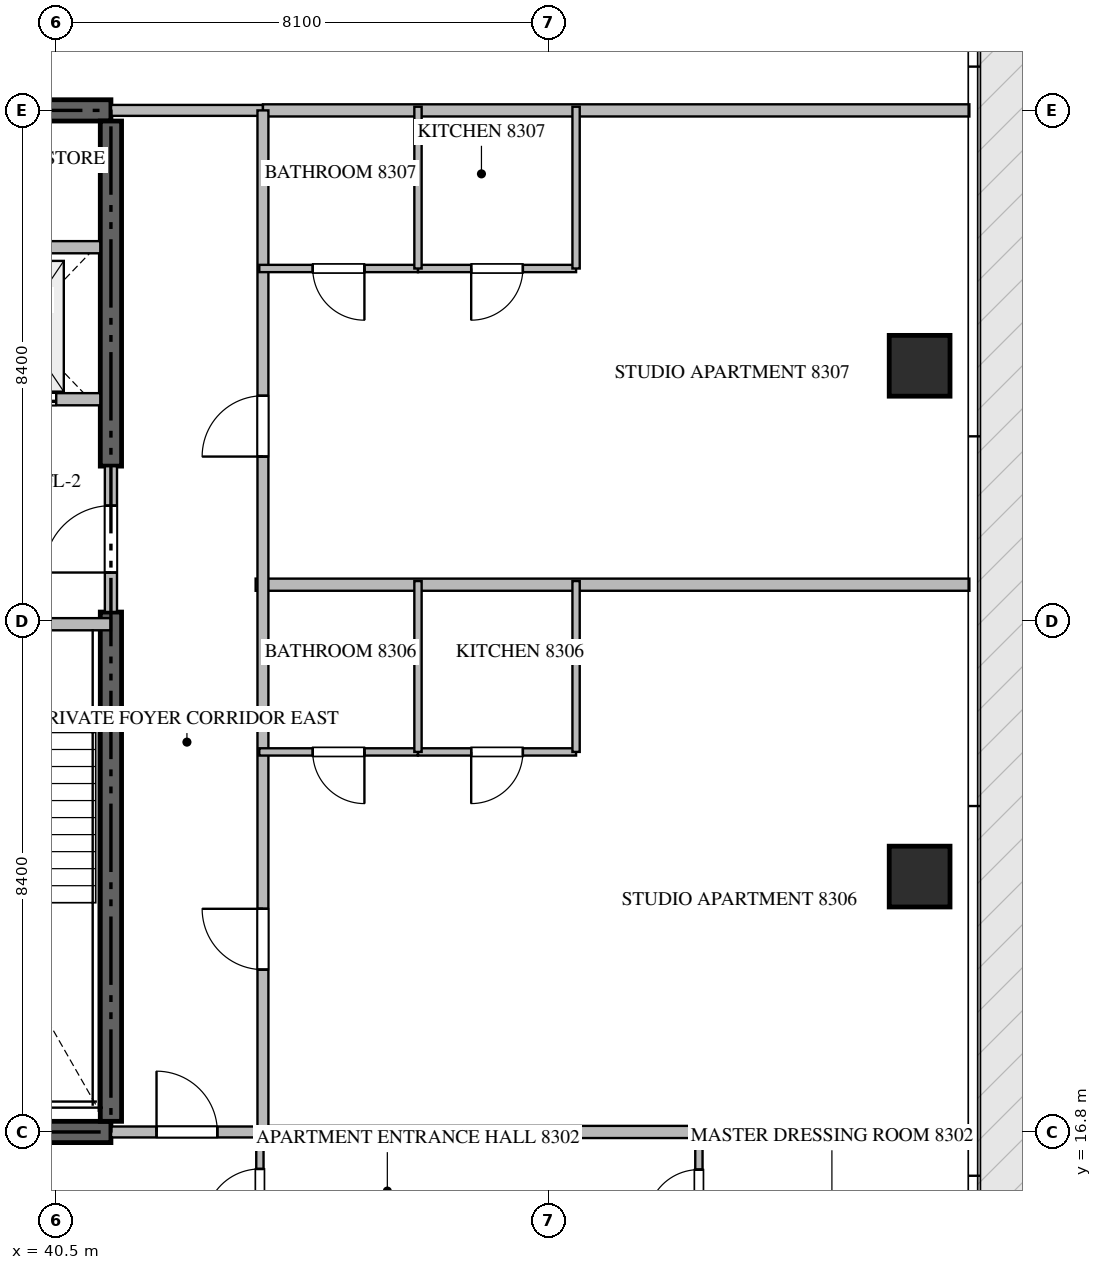
"""IFC4 building model, lengths in metres.
Left out: names, types, materials, properties, quantities, classifications, styles, units other than length and angle.
Written with IfcOpenShell. Run it as: python <this file> out.ifc"""

import sys

from ifc_helpers import new_model, si_unit, direction, frame, frame_2d, origin, origin_2d, place, context, subcontext, project, spatial, rectangle, extrude, source, transform, mapped, element, fill, save


model = new_model("IFC4")
c1 = context("Model", 3, precision=1e-05, world=origin(), true_north=direction((0.0, 1.0)))
c2 = subcontext(c1, "Body", "Model", "MODEL_VIEW")
j1 = project(units=[si_unit("LENGTHUNIT", "METRE"), si_unit("PLANEANGLEUNIT", "RADIAN")], contexts=[c1])
p1 = place(None, origin())
s1 = spatial("IfcSite", under=j1, at=p1, CompositionType="ELEMENT")
p2 = place(p1, origin())
s2 = spatial("IfcBuilding", under=s1, at=p2, CompositionType="ELEMENT")
p3 = place(p2, frame((0.0, 0.0, 333.95)))
s3 = spatial("IfcBuildingStorey", under=s2, at=p3, CompositionType="ELEMENT", Elevation=333.95)
for number, where, z_axis, x_axis in (
    (1, (23.4, 16.8, -0.26), (0.0, 0.0, 1.0), (1.0, 0.0, 0.0)),
    (2, (41.4, 33.6, -0.26), (0.0, 0.0, 1.0), (-1.0, 0.0, 0.0)),
):
    element("IfcWall", number, at=place(p3, frame(where, z_axis=z_axis, x_axis=x_axis)), inside=s3, PredefinedType="SHEAR", context=c2, shape_type="SweptSolid", body=[
        extrude(rectangle(XDim=18.0, YDim=0.35, at=frame_2d((9.0, 0.0))), origin(), (0.0, 0.0, 1.0), 3.868),
    ])
p4 = place(p3, frame((41.4, 16.975, -0.26), z_axis=(0.0, 0.0, 1.0), x_axis=(0.0, 1.0, 0.0)))
e3 = element("IfcWall", 3, at=p4, inside=s3, PredefinedType="SHEAR", context=c2, shape_type="SweptSolid", body=[
    extrude(rectangle(XDim=8.375, YDim=0.35, at=frame_2d((4.188, 0.0))), origin(), (0.0, 0.0, 1.0), 3.868),
])
p5 = place(p3, frame((41.4, 27.75, -0.26), z_axis=(0.0, 0.0, 1.0), x_axis=(0.0, 1.0, 0.0)))
e4 = element("IfcWall", 4, at=p5, inside=s3, PredefinedType="SHEAR", context=c2, shape_type="SweptSolid", body=[
    extrude(rectangle(XDim=5.675, YDim=0.35, at=frame_2d((2.837, 0.0))), origin(), (0.0, 0.0, 1.0), 3.868),
])
m1 = source(origin(), c2, "Body", "SweptSolid", [
    extrude(rectangle(XDim=1.0, YDim=1.0, at=origin_2d()), origin(), (0.0, 0.0, 1.0), 3.87),
])
for number, where, z_axis, x_axis in (
    (5, (54.7, 21.0, -0.26), (0.0, 0.0, 1.0), (1.0, 0.0, 0.0)),
    (6, (54.7, 29.4, -0.26), (0.0, 0.0, 1.0), (1.0, 0.0, 0.0)),
):
    element("IfcColumn", number, at=place(p3, frame(where, z_axis=z_axis, x_axis=x_axis)), inside=s3, PredefinedType="COLUMN", context=c2, shape_type="MappedRepresentation", body=[
        mapped(m1, transform((0.0, 0.0, 0.0), scale=1.0)),
    ])
p6 = place(p3, frame((36.95, 25.15, 0.0), z_axis=(0.0, 0.0, 1.0), x_axis=(1.0, 0.0, 0.0)))
e7 = element("IfcWall", 7, at=p6, inside=s3, PredefinedType="STANDARD", context=c2, shape_type="SweptSolid", body=[
    extrude(rectangle(XDim=4.45, YDim=0.2, at=frame_2d((2.225, 0.0))), origin(), (0.0, 0.0, 1.0), 3.61),
])
p7 = place(p6, frame((1.65, 0.0, 0.0)))
e8 = element("IfcOpeningElement", 8, at=p7, cuts=e7, PredefinedType="OPENING", context=c2, shape_type="SweptSolid", body=[
    extrude(rectangle(XDim=1.1, YDim=2.15, at=frame_2d((0.55, 1.075))), frame((0.0, 0.11, 0.0), z_axis=(0.0, -1.0, 0.0), x_axis=(1.0, 0.0, 0.0)), (0.0, 0.0, 1.0), 0.22),
])
p8 = place(p3, frame((38.75, 28.85, 0.0), z_axis=(0.0, 0.0, 1.0), x_axis=(1.0, 0.0, 0.0)))
e9 = element("IfcWall", 9, at=p8, inside=s3, PredefinedType="STANDARD", context=c2, shape_type="SweptSolid", body=[
    extrude(rectangle(XDim=2.475, YDim=0.2, at=frame_2d((1.238, 0.0))), origin(), (0.0, 0.0, 1.0), 3.61),
])
p9 = place(p8, frame((0.55, 0.0, 0.0)))
e10 = element("IfcOpeningElement", 10, at=p9, cuts=e9, PredefinedType="OPENING", context=c2, shape_type="SweptSolid", body=[
    extrude(rectangle(XDim=1.2, YDim=2.2, at=frame_2d((0.6, 1.1))), frame((0.0, 0.11, 0.0), z_axis=(0.0, -1.0, 0.0), x_axis=(1.0, 0.0, 0.0)), (0.0, 0.0, 1.0), 0.22),
])
p10 = place(p3, frame((38.75, 31.35, 0.0), z_axis=(0.0, 0.0, 1.0), x_axis=(1.0, 0.0, 0.0)))
e11 = element("IfcWall", 11, at=p10, inside=s3, PredefinedType="STANDARD", context=c2, shape_type="SweptSolid", body=[
    extrude(rectangle(XDim=2.475, YDim=0.2, at=frame_2d((1.238, 0.0))), origin(), (0.0, 0.0, 1.0), 3.61),
])
p11 = place(p3, frame((41.4, 25.352, 0.0), z_axis=(0.0, 0.0, 1.0), x_axis=(0.0, 1.0, 0.0)))
e12 = element("IfcWall", 12, at=p11, inside=s3, PredefinedType="STANDARD", context=c2, shape_type="SweptSolid", body=[
    extrude(rectangle(XDim=2.396, YDim=0.2, at=frame_2d((1.198, 0.0))), origin(), (0.0, 0.0, 1.0), 3.61),
])
p12 = place(p11, frame((0.648, 0.0, 0.0)))
e13 = element("IfcOpeningElement", 13, at=p12, cuts=e12, PredefinedType="OPENING", context=c2, shape_type="SweptSolid", body=[
    extrude(rectangle(XDim=1.1, YDim=2.15, at=frame_2d((0.55, 1.075))), frame((0.0, 0.11, 0.0), z_axis=(0.0, -1.0, 0.0), x_axis=(1.0, 0.0, 0.0)), (0.0, 0.0, 1.0), 0.22),
])
p13 = place(p3, frame((43.78, 25.8, 0.0), z_axis=(0.0, 0.0, 1.0), x_axis=(1.0, 0.0, 0.0)))
e14 = element("IfcWall", 14, at=p13, inside=s3, PredefinedType="PARTITIONING", context=c2, shape_type="SweptSolid", body=[
    extrude(rectangle(XDim=11.738, YDim=0.2, at=frame_2d((5.869, 0.0))), origin(), (0.0, 0.0, 1.0), 3.61),
])
for number, where, z_axis, x_axis in (
    (15, (43.9, 16.8, 0.0), (0.0, 0.0, 1.0), (1.0, 0.0, 0.0)),
    (16, (43.9, 33.6, 0.0), (0.0, 0.0, 1.0), (1.0, 0.0, 0.0)),
):
    element("IfcWall", number, at=place(p3, frame(where, z_axis=z_axis, x_axis=x_axis)), inside=s3, PredefinedType="PARTITIONING", context=c2, shape_type="SweptSolid", body=[
        extrude(rectangle(XDim=11.618, YDim=0.2, at=frame_2d((5.809, 0.0))), origin(), (0.0, 0.0, 1.0), 3.61),
    ])
p14 = place(p3, frame((41.402, 16.8, 0.0), z_axis=(0.0, 0.0, 1.0), x_axis=(1.0, 0.0, 0.0)))
e17 = element("IfcWall", 17, at=p14, inside=s3, PredefinedType="PARTITIONING", context=c2, shape_type="SweptSolid", body=[
    extrude(rectangle(XDim=2.496, YDim=0.18, at=frame_2d((1.248, 0.0))), origin(), (0.0, 0.0, 1.0), 3.61),
])
p15 = place(p14, frame((0.748, 0.0, 0.0)))
e18 = element("IfcOpeningElement", 18, at=p15, cuts=e17, PredefinedType="OPENING", context=c2, shape_type="SweptSolid", body=[
    extrude(rectangle(XDim=1.0, YDim=2.15, at=frame_2d((0.5, 1.075))), frame((0.0, 0.1, 0.0), z_axis=(0.0, -1.0, 0.0), x_axis=(1.0, 0.0, 0.0)), (0.0, 0.0, 1.0), 0.2),
])
p16 = place(p3, frame((41.402, 33.6, 0.0), z_axis=(0.0, 0.0, 1.0), x_axis=(1.0, 0.0, 0.0)))
e19 = element("IfcWall", 19, at=p16, inside=s3, PredefinedType="PARTITIONING", context=c2, shape_type="SweptSolid", body=[
    extrude(rectangle(XDim=2.496, YDim=0.18, at=frame_2d((1.248, 0.0))), origin(), (0.0, 0.0, 1.0), 3.61),
])
p17 = place(p3, frame((43.9, 16.8, 0.0), z_axis=(0.0, 0.0, 1.0), x_axis=(0.0, 1.0, 0.0)))
e20 = element("IfcWall", 20, at=p17, inside=s3, PredefinedType="PARTITIONING", context=c2, shape_type="SweptSolid", body=[
    extrude(rectangle(XDim=16.8, YDim=0.18, at=frame_2d((8.4, 0.0))), origin(), (0.0, 0.0, 1.0), 3.61),
])
p18 = place(p17, frame((2.67, 0.0, 0.0)))
e21 = element("IfcOpeningElement", 21, at=p18, cuts=e20, PredefinedType="OPENING", context=c2, shape_type="SweptSolid", body=[
    extrude(rectangle(XDim=1.0, YDim=2.15, at=frame_2d((0.5, 1.075))), frame((0.0, 0.1, 0.0), z_axis=(0.0, -1.0, 0.0), x_axis=(1.0, 0.0, 0.0)), (0.0, 0.0, 1.0), 0.2),
])
p19 = place(p17, frame((11.107, 0.0, 0.0)))
e22 = element("IfcOpeningElement", 22, at=p19, cuts=e20, PredefinedType="OPENING", context=c2, shape_type="SweptSolid", body=[
    extrude(rectangle(XDim=1.0, YDim=2.15, at=frame_2d((0.5, 1.075))), frame((0.0, 0.1, 0.0), z_axis=(0.0, -1.0, 0.0), x_axis=(1.0, 0.0, 0.0)), (0.0, 0.0, 1.0), 0.2),
])
p20 = place(p3, frame((43.85, 14.65, 0.0), z_axis=(0.0, 0.0, 1.0), x_axis=(0.0, 1.0, 0.0)))
e23 = element("IfcWall", 23, at=p20, inside=s3, PredefinedType="PARTITIONING", context=c2, shape_type="SweptSolid", body=[
    extrude(rectangle(XDim=2.148, YDim=0.12, at=frame_2d((1.074, 0.0))), origin(), (0.0, 0.0, 1.0), 3.61),
])
p21 = place(p20, frame((0.642, 0.0, 0.0)))
e24 = element("IfcOpeningElement", 24, at=p21, cuts=e23, PredefinedType="OPENING", context=c2, shape_type="SweptSolid", body=[
    extrude(rectangle(XDim=0.9, YDim=2.1, at=frame_2d((0.45, 1.05))), frame((0.0, 0.07, 0.0), z_axis=(0.0, -1.0, 0.0), x_axis=(1.0, 0.0, 0.0)), (0.0, 0.0, 1.0), 0.14),
])
p22 = place(p3, frame((51.07, 14.652, 0.0), z_axis=(0.0, 0.0, 1.0), x_axis=(0.0, 1.0, 0.0)))
e25 = element("IfcWall", 25, at=p22, inside=s3, PredefinedType="PARTITIONING", context=c2, shape_type="SweptSolid", body=[
    extrude(rectangle(XDim=2.208, YDim=0.12, at=frame_2d((1.104, 0.0))), origin(), (0.0, 0.0, 1.0), 3.61),
])
p23 = place(p22, frame((0.679, 0.0, 0.0)))
e26 = element("IfcOpeningElement", 26, at=p23, cuts=e25, PredefinedType="OPENING", context=c2, shape_type="SweptSolid", body=[
    extrude(rectangle(XDim=0.85, YDim=2.1, at=frame_2d((0.425, 1.05))), frame((0.0, 0.07, 0.0), z_axis=(0.0, -1.0, 0.0), x_axis=(1.0, 0.0, 0.0)), (0.0, 0.0, 1.0), 0.14),
])
p24 = place(p3, frame((49.05, 23.05, 0.0), z_axis=(0.0, 0.0, 1.0), x_axis=(-1.0, 0.0, 0.0)))
e27 = element("IfcWall", 27, at=p24, inside=s3, PredefinedType="PARTITIONING", context=c2, shape_type="SweptSolid", body=[
    extrude(rectangle(XDim=2.6, YDim=0.12, at=frame_2d((1.3, 0.0))), origin(), (0.0, 0.0, 1.0), 3.61),
])
p25 = place(p24, frame((0.875, 0.0, 0.0)))
e28 = element("IfcOpeningElement", 28, at=p25, cuts=e27, PredefinedType="OPENING", context=c2, shape_type="SweptSolid", body=[
    extrude(rectangle(XDim=0.85, YDim=2.1, at=frame_2d((0.425, 1.05))), frame((0.0, 0.07, 0.0), z_axis=(0.0, -1.0, 0.0), x_axis=(1.0, 0.0, 0.0)), (0.0, 0.0, 1.0), 0.14),
])
p26 = place(p3, frame((46.448, 23.05, 0.0), z_axis=(0.0, 0.0, 1.0), x_axis=(-1.0, 0.0, 0.0)))
e29 = element("IfcWall", 29, at=p26, inside=s3, PredefinedType="PARTITIONING", context=c2, shape_type="SweptSolid", body=[
    extrude(rectangle(XDim=2.608, YDim=0.12, at=frame_2d((1.304, 0.0))), origin(), (0.0, 0.0, 1.0), 3.61),
])
p27 = place(p26, frame((0.879, 0.0, 0.0)))
e30 = element("IfcOpeningElement", 30, at=p27, cuts=e29, PredefinedType="OPENING", context=c2, shape_type="SweptSolid", body=[
    extrude(rectangle(XDim=0.85, YDim=2.1, at=frame_2d((0.425, 1.05))), frame((0.0, 0.07, 0.0), z_axis=(0.0, -1.0, 0.0), x_axis=(1.0, 0.0, 0.0)), (0.0, 0.0, 1.0), 0.14),
])
for number, where, z_axis, x_axis in (
    (31, (46.45, 23.05, 0.0), (0.0, 0.0, 1.0), (0.0, 1.0, 0.0)),
    (32, (49.05, 23.05, 0.0), (0.0, 0.0, 1.0), (0.0, 1.0, 0.0)),
):
    element("IfcWall", number, at=place(p3, frame(where, z_axis=z_axis, x_axis=x_axis)), inside=s3, PredefinedType="PARTITIONING", context=c2, shape_type="SweptSolid", body=[
        extrude(rectangle(XDim=2.81, YDim=0.12, at=frame_2d((1.405, 0.0))), origin(), (0.0, 0.0, 1.0), 3.61),
    ])
p28 = place(p3, frame((49.05, 31.0, 0.0), z_axis=(0.0, 0.0, 1.0), x_axis=(-1.0, 0.0, 0.0)))
e33 = element("IfcWall", 33, at=p28, inside=s3, PredefinedType="PARTITIONING", context=c2, shape_type="SweptSolid", body=[
    extrude(rectangle(XDim=2.6, YDim=0.12, at=frame_2d((1.3, 0.0))), origin(), (0.0, 0.0, 1.0), 3.61),
])
p29 = place(p28, frame((0.875, 0.0, 0.0)))
e34 = element("IfcOpeningElement", 34, at=p29, cuts=e33, PredefinedType="OPENING", context=c2, shape_type="SweptSolid", body=[
    extrude(rectangle(XDim=0.85, YDim=2.1, at=frame_2d((0.425, 1.05))), frame((0.0, 0.07, 0.0), z_axis=(0.0, -1.0, 0.0), x_axis=(1.0, 0.0, 0.0)), (0.0, 0.0, 1.0), 0.14),
])
p30 = place(p3, frame((46.448, 31.0, 0.0), z_axis=(0.0, 0.0, 1.0), x_axis=(-1.0, 0.0, 0.0)))
e35 = element("IfcWall", 35, at=p30, inside=s3, PredefinedType="PARTITIONING", context=c2, shape_type="SweptSolid", body=[
    extrude(rectangle(XDim=2.608, YDim=0.12, at=frame_2d((1.304, 0.0))), origin(), (0.0, 0.0, 1.0), 3.61),
])
p31 = place(p30, frame((0.879, 0.0, 0.0)))
e36 = element("IfcOpeningElement", 36, at=p31, cuts=e35, PredefinedType="OPENING", context=c2, shape_type="SweptSolid", body=[
    extrude(rectangle(XDim=0.85, YDim=2.1, at=frame_2d((0.425, 1.05))), frame((0.0, 0.07, 0.0), z_axis=(0.0, -1.0, 0.0), x_axis=(1.0, 0.0, 0.0)), (0.0, 0.0, 1.0), 0.14),
])
for number, where, z_axis, x_axis in (
    (37, (46.45, 31.0, 0.0), (0.0, 0.0, 1.0), (0.0, 1.0, 0.0)),
    (38, (49.05, 31.0, 0.0), (0.0, 0.0, 1.0), (0.0, 1.0, 0.0)),
):
    element("IfcWall", number, at=place(p3, frame(where, z_axis=z_axis, x_axis=x_axis)), inside=s3, PredefinedType="PARTITIONING", context=c2, shape_type="SweptSolid", body=[
        extrude(rectangle(XDim=2.66, YDim=0.12, at=frame_2d((1.33, 0.0))), origin(), (0.0, 0.0, 1.0), 3.61),
    ])
m2 = source(origin(), c2, "Body", "SweptSolid", [
    extrude(rectangle(XDim=1.2, YDim=2.2, at=frame_2d((0.6, 1.1))), frame((0.0, 0.025, 0.0), z_axis=(0.0, -1.0, 0.0), x_axis=(1.0, 0.0, 0.0)), (0.0, 0.0, 1.0), 0.05),
])
p32 = place(p9, origin())
e39 = element("IfcDoor", 39, at=p32, inside=s3, OperationType="DOUBLE_DOOR_SLIDING", PredefinedType="DOOR", context=c2, shape_type="MappedRepresentation", body=[
    mapped(m2, transform((0.0, 0.0, 0.0), scale=1.0)),
])
fill(e10, e39)
m3 = source(origin(), c2, "Body", "SweptSolid", [
    extrude(rectangle(XDim=1.1, YDim=2.15, at=frame_2d((0.55, 1.075))), frame((0.0, 0.025, 0.0), z_axis=(0.0, -1.0, 0.0), x_axis=(1.0, 0.0, 0.0)), (0.0, 0.0, 1.0), 0.05),
])
p33 = place(p12, origin())
e40 = element("IfcDoor", 40, at=p33, inside=s3, OperationType="SINGLE_SWING_LEFT", PredefinedType="DOOR", context=c2, shape_type="MappedRepresentation", body=[
    mapped(m3, transform((0.0, 0.0, 0.0), scale=1.0)),
])
fill(e13, e40)
m4 = source(origin(), c2, "Body", "SweptSolid", [
    extrude(rectangle(XDim=1.0, YDim=2.15, at=frame_2d((0.5, 1.075))), frame((0.0, 0.025, 0.0), z_axis=(0.0, -1.0, 0.0), x_axis=(1.0, 0.0, 0.0)), (0.0, 0.0, 1.0), 0.05),
])
p34 = place(p15, origin())
e41 = element("IfcDoor", 41, at=p34, inside=s3, OperationType="SINGLE_SWING_LEFT", PredefinedType="DOOR", context=c2, shape_type="MappedRepresentation", body=[
    mapped(m4, transform((0.0, 0.0, 0.0), scale=1.0)),
])
fill(e18, e41)
p35 = place(p18, origin())
e42 = element("IfcDoor", 42, at=p35, inside=s3, OperationType="SINGLE_SWING_RIGHT", PredefinedType="DOOR", context=c2, shape_type="MappedRepresentation", body=[
    mapped(m4, transform((0.0, 0.0, 0.0), scale=1.0)),
])
fill(e21, e42)
p36 = place(p19, origin())
e43 = element("IfcDoor", 43, at=p36, inside=s3, OperationType="SINGLE_SWING_LEFT", PredefinedType="DOOR", context=c2, shape_type="MappedRepresentation", body=[
    mapped(m4, transform((0.0, 0.0, 0.0), scale=1.0)),
])
fill(e22, e43)
m5 = source(origin(), c2, "Body", "SweptSolid", [
    extrude(rectangle(XDim=0.9, YDim=2.1, at=frame_2d((0.45, 1.05))), frame((0.0, 0.025, 0.0), z_axis=(0.0, -1.0, 0.0), x_axis=(1.0, 0.0, 0.0)), (0.0, 0.0, 1.0), 0.05),
])
p37 = place(p21, origin())
e44 = element("IfcDoor", 44, at=p37, inside=s3, OperationType="SINGLE_SWING_LEFT", PredefinedType="DOOR", context=c2, shape_type="MappedRepresentation", body=[
    mapped(m5, transform((0.0, 0.0, 0.0), scale=1.0)),
])
fill(e24, e44)
m6 = source(origin(), c2, "Body", "SweptSolid", [
    extrude(rectangle(XDim=0.85, YDim=2.1, at=frame_2d((0.425, 1.05))), frame((0.0, 0.025, 0.0), z_axis=(0.0, -1.0, 0.0), x_axis=(1.0, 0.0, 0.0)), (0.0, 0.0, 1.0), 0.05),
])
p38 = place(p23, origin())
e45 = element("IfcDoor", 45, at=p38, inside=s3, OperationType="SINGLE_SWING_LEFT", PredefinedType="DOOR", context=c2, shape_type="MappedRepresentation", body=[
    mapped(m6, transform((0.0, 0.0, 0.0), scale=1.0)),
])
fill(e26, e45)
p39 = place(p25, origin())
e46 = element("IfcDoor", 46, at=p39, inside=s3, OperationType="SINGLE_SWING_RIGHT", PredefinedType="DOOR", context=c2, shape_type="MappedRepresentation", body=[
    mapped(m6, transform((0.0, 0.0, 0.0), scale=1.0)),
])
fill(e28, e46)
p40 = place(p27, origin())
e47 = element("IfcDoor", 47, at=p40, inside=s3, OperationType="SINGLE_SWING_LEFT", PredefinedType="DOOR", context=c2, shape_type="MappedRepresentation", body=[
    mapped(m6, transform((0.0, 0.0, 0.0), scale=1.0)),
])
fill(e30, e47)
p41 = place(p29, origin())
e48 = element("IfcDoor", 48, at=p41, inside=s3, OperationType="SINGLE_SWING_RIGHT", PredefinedType="DOOR", context=c2, shape_type="MappedRepresentation", body=[
    mapped(m6, transform((0.0, 0.0, 0.0), scale=1.0)),
])
fill(e34, e48)
p42 = place(p31, origin())
e49 = element("IfcDoor", 49, at=p42, inside=s3, OperationType="SINGLE_SWING_LEFT", PredefinedType="DOOR", context=c2, shape_type="MappedRepresentation", body=[
    mapped(m6, transform((0.0, 0.0, 0.0), scale=1.0)),
])
fill(e36, e49)
save(model, sys.argv[1])
